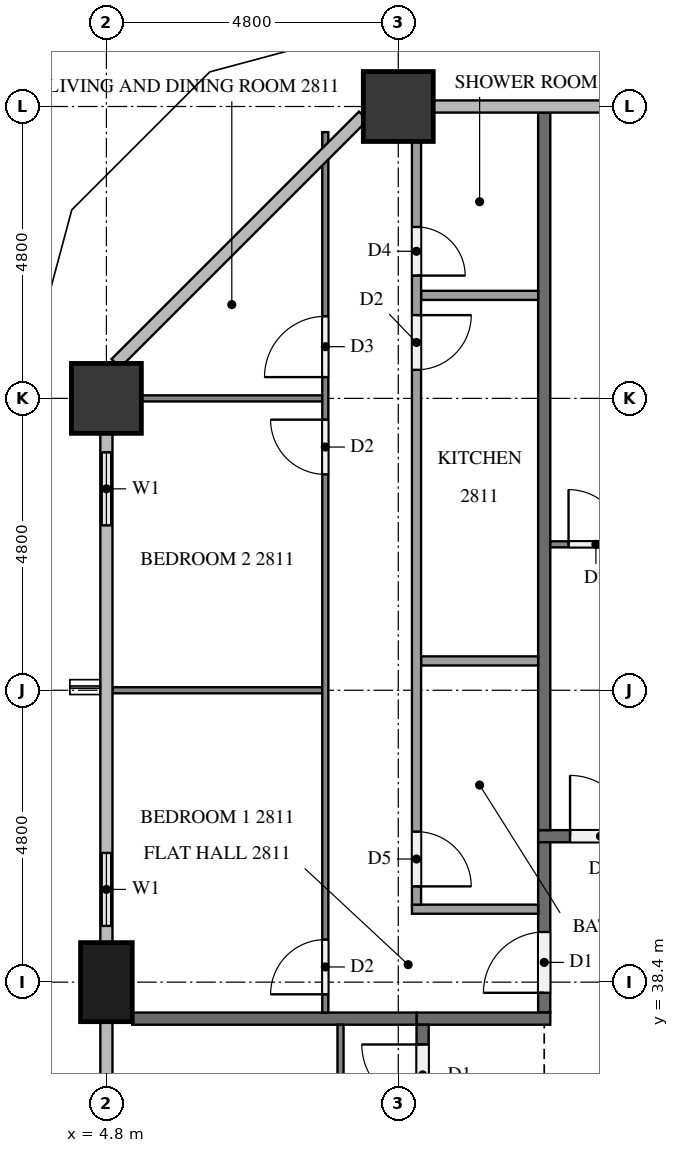
"""IFC4 building model, lengths in metres.
Left out: names, types, materials, properties, quantities, classifications, styles, units other than length and angle.
Written with IfcOpenShell. Run it as: python <this file> out.ifc"""

import sys

from ifc_helpers import new_model, si_unit, direction, frame, frame_2d, origin, origin_2d, place, context, subcontext, project, spatial, rectangle, extrude, element, fill, save


model = new_model("IFC4")
c1 = context("Model", 3, precision=1e-05, world=origin(), true_north=direction((0.0, 1.0)))
c2 = subcontext(c1, "Body", "Model", "MODEL_VIEW")
j1 = project(units=[si_unit("LENGTHUNIT", "METRE"), si_unit("PLANEANGLEUNIT", "RADIAN")], contexts=[c1])
p1 = place(None, origin())
s1 = spatial("IfcSite", under=j1, at=p1, CompositionType="ELEMENT")
p2 = place(p1, origin())
s2 = spatial("IfcBuilding", under=s1, at=p2, CompositionType="ELEMENT")
p3 = place(p2, frame((0.0, 0.0, 110.2)))
s3 = spatial("IfcBuildingStorey", under=s2, at=p3, CompositionType="ELEMENT", Elevation=110.2)
for number, where, z_axis, x_axis in (
    (1, (9.6, 52.8, 0.0), (0.0, 0.0, 1.0), (1.0, 0.0, 0.0)),
    (2, (4.8, 48.0, 0.0), (0.0, 0.0, 1.0), (1.0, 0.0, 0.0)),
):
    element("IfcColumn", number, at=place(p3, frame(where, z_axis=z_axis, x_axis=x_axis)), inside=s3, PredefinedType="COLUMN", context=c2, shape_type="SweptSolid", body=[
        extrude(rectangle(XDim=1.15, YDim=1.15, at=origin_2d()), origin(), (0.0, 0.0, 1.0), 3.1),
    ])
p4 = place(p3, frame((4.8, 38.4, 0.0), z_axis=(0.0, 0.0, 1.0), x_axis=(0.0, 1.0, 0.0)))
e3 = element("IfcColumn", 3, at=p4, inside=s3, PredefinedType="COLUMN", context=c2, shape_type="SweptSolid", body=[
    extrude(rectangle(XDim=1.3, YDim=0.85, at=origin_2d()), origin(), (0.0, 0.0, 1.0), 3.1),
])
p5 = place(p3, frame((4.8, 47.425, 0.0), z_axis=(0.0, 0.0, 1.0), x_axis=(0.0, -1.0, 0.0)))
e4 = element("IfcWall", 4, at=p5, inside=s3, PredefinedType="SOLIDWALL", context=c2, shape_type="SweptSolid", body=[
    extrude(rectangle(XDim=1.825, YDim=0.15, at=frame_2d((0.913, 0.0))), origin(), (0.0, 0.0, 1.0), 3.1),
])
p6 = place(p5, frame((0.312, 0.0, 0.9)))
e5 = element("IfcOpeningElement", 5, at=p6, cuts=e4, PredefinedType="OPENING", context=c2, shape_type="SweptSolid", body=[
    extrude(rectangle(XDim=1.2, YDim=1.4, at=frame_2d((0.6, 0.7))), frame((0.0, 0.085, 0.0), z_axis=(0.0, -1.0, 0.0), x_axis=(1.0, 0.0, 0.0)), (0.0, 0.0, 1.0), 0.17),
])
p7 = place(p3, frame((4.8, 40.8, 0.0), z_axis=(0.0, 0.0, 1.0), x_axis=(0.0, -1.0, 0.0)))
e6 = element("IfcWall", 6, at=p7, inside=s3, PredefinedType="SOLIDWALL", context=c2, shape_type="SweptSolid", body=[
    extrude(rectangle(XDim=1.75, YDim=0.15, at=frame_2d((0.875, 0.0))), origin(), (0.0, 0.0, 1.0), 3.1),
])
p8 = place(p7, frame((0.275, 0.0, 0.9)))
e7 = element("IfcOpeningElement", 7, at=p8, cuts=e6, PredefinedType="OPENING", context=c2, shape_type="SweptSolid", body=[
    extrude(rectangle(XDim=1.2, YDim=1.4, at=frame_2d((0.6, 0.7))), frame((0.0, 0.085, 0.0), z_axis=(0.0, -1.0, 0.0), x_axis=(1.0, 0.0, 0.0)), (0.0, 0.0, 1.0), 0.17),
])
p9 = place(p3, frame((11.9, 40.8, 0.0), z_axis=(0.0, 0.0, 1.0), x_axis=(1.0, 0.0, 0.0)))
e8 = element("IfcWall", 8, at=p9, inside=s3, PredefinedType="PARTITIONING", context=c2, shape_type="SweptSolid", body=[
    extrude(rectangle(XDim=38.6, YDim=0.2, at=frame_2d((19.3, 0.0))), origin(), (0.0, 0.0, 1.0), 3.1),
])
p10 = place(p9, frame((37.075, 0.0, 0.0)))
e9 = element("IfcOpeningElement", 9, at=p10, cuts=e8, PredefinedType="OPENING", context=c2, shape_type="SweptSolid", body=[
    extrude(rectangle(XDim=1.0, YDim=2.1, at=frame_2d((0.5, 1.05))), frame((0.0, 0.11, 0.0), z_axis=(0.0, -1.0, 0.0), x_axis=(1.0, 0.0, 0.0)), (0.0, 0.0, 1.0), 0.22),
])
p11 = place(p9, frame((14.925, 0.0, 0.0)))
e10 = element("IfcOpeningElement", 10, at=p11, cuts=e8, PredefinedType="OPENING", context=c2, shape_type="SweptSolid", body=[
    extrude(rectangle(XDim=1.0, YDim=2.1, at=frame_2d((0.5, 1.05))), frame((0.0, 0.11, 0.0), z_axis=(0.0, -1.0, 0.0), x_axis=(1.0, 0.0, 0.0)), (0.0, 0.0, 1.0), 0.22),
])
p12 = place(p9, frame((0.525, 0.0, 0.0)))
e11 = element("IfcOpeningElement", 11, at=p12, cuts=e8, PredefinedType="OPENING", context=c2, shape_type="SweptSolid", body=[
    extrude(rectangle(XDim=1.0, YDim=2.1, at=frame_2d((0.5, 1.05))), frame((0.0, 0.11, 0.0), z_axis=(0.0, -1.0, 0.0), x_axis=(1.0, 0.0, 0.0)), (0.0, 0.0, 1.0), 0.22),
])
p13 = place(p3, frame((12.0, 37.9, 0.0), z_axis=(0.0, 0.0, 1.0), x_axis=(0.0, 1.0, 0.0)))
e12 = element("IfcWall", 12, at=p13, inside=s3, PredefinedType="PARTITIONING", context=c2, shape_type="SweptSolid", body=[
    extrude(rectangle(XDim=2.8, YDim=0.2, at=frame_2d((1.4, 0.0))), origin(), (0.0, 0.0, 1.0), 3.1),
])
p14 = place(p13, frame((0.325, 0.0, 0.0)))
e13 = element("IfcOpeningElement", 13, at=p14, cuts=e12, PredefinedType="OPENING", context=c2, shape_type="SweptSolid", body=[
    extrude(rectangle(XDim=1.0, YDim=2.1, at=frame_2d((0.5, 1.05))), frame((0.0, 0.11, 0.0), z_axis=(0.0, -1.0, 0.0), x_axis=(1.0, 0.0, 0.0)), (0.0, 0.0, 1.0), 0.22),
])
p15 = place(p3, frame((12.1, 37.8, 0.0), z_axis=(0.0, 0.0, 1.0), x_axis=(-1.0, 0.0, 0.0)))
e14 = element("IfcWall", 14, at=p15, inside=s3, PredefinedType="PARTITIONING", context=c2, shape_type="SweptSolid", body=[
    extrude(rectangle(XDim=2.2, YDim=0.2, at=frame_2d((1.1, 0.0))), origin(), (0.0, 0.0, 1.0), 3.1),
])
p16 = place(p3, frame((10.0, 15.1, 0.0), z_axis=(0.0, 0.0, 1.0), x_axis=(0.0, 1.0, 0.0)))
e15 = element("IfcWall", 15, at=p16, inside=s3, PredefinedType="PARTITIONING", context=c2, shape_type="SweptSolid", body=[
    extrude(rectangle(XDim=22.6, YDim=0.2, at=frame_2d((11.3, 0.0))), origin(), (0.0, 0.0, 1.0), 3.1),
])
p17 = place(p16, frame((21.275, 0.0, 0.0)))
e16 = element("IfcOpeningElement", 16, at=p17, cuts=e15, PredefinedType="OPENING", context=c2, shape_type="SweptSolid", body=[
    extrude(rectangle(XDim=1.0, YDim=2.1, at=frame_2d((0.5, 1.05))), frame((0.0, 0.11, 0.0), z_axis=(0.0, -1.0, 0.0), x_axis=(1.0, 0.0, 0.0)), (0.0, 0.0, 1.0), 0.22),
])
p18 = place(p3, frame((12.0, 52.7, 0.0), z_axis=(0.0, 0.0, 1.0), x_axis=(0.0, -1.0, 0.0)))
e17 = element("IfcWall", 17, at=p18, inside=s3, PredefinedType="PARTITIONING", context=c2, shape_type="SweptSolid", body=[
    extrude(rectangle(XDim=11.8, YDim=0.2, at=frame_2d((5.9, 0.0))), origin(), (0.0, 0.0, 1.0), 3.1),
])
p19 = place(p3, frame((5.225, 37.8, 0.0), z_axis=(0.0, 0.0, 1.0), x_axis=(1.0, 0.0, 0.0)))
e18 = element("IfcWall", 18, at=p19, inside=s3, PredefinedType="PARTITIONING", context=c2, shape_type="SweptSolid", body=[
    extrude(rectangle(XDim=4.675, YDim=0.2, at=frame_2d((2.337, 0.0))), origin(), (0.0, 0.0, 1.0), 3.1),
])
p20 = place(p3, frame((12.1, 45.6, 0.0), z_axis=(0.0, 0.0, 1.0), x_axis=(1.0, 0.0, 0.0)))
e19 = element("IfcWall", 19, at=p20, inside=s3, PredefinedType="PARTITIONING", context=c2, shape_type="SweptSolid", body=[
    extrude(rectangle(XDim=14.2, YDim=0.1, at=frame_2d((7.1, 0.0))), origin(), (0.0, 0.0, 1.0), 3.1),
])
p21 = place(p20, frame((0.3, 0.0, 0.0)))
e20 = element("IfcOpeningElement", 20, at=p21, cuts=e19, PredefinedType="OPENING", context=c2, shape_type="SweptSolid", body=[
    extrude(rectangle(XDim=0.9, YDim=2.1, at=frame_2d((0.45, 1.05))), frame((0.0, 0.06, 0.0), z_axis=(0.0, -1.0, 0.0), x_axis=(1.0, 0.0, 0.0)), (0.0, 0.0, 1.0), 0.12),
])
p22 = place(p20, frame((8.15, 0.0, 0.0)))
e21 = element("IfcOpeningElement", 21, at=p22, cuts=e19, PredefinedType="OPENING", context=c2, shape_type="SweptSolid", body=[
    extrude(rectangle(XDim=1.0, YDim=2.1, at=frame_2d((0.5, 1.05))), frame((0.0, 0.06, 0.0), z_axis=(0.0, -1.0, 0.0), x_axis=(1.0, 0.0, 0.0)), (0.0, 0.0, 1.0), 0.12),
])
p23 = place(p20, frame((9.85, 0.0, 0.0)))
e22 = element("IfcOpeningElement", 22, at=p23, cuts=e19, PredefinedType="OPENING", context=c2, shape_type="SweptSolid", body=[
    extrude(rectangle(XDim=0.9, YDim=2.1, at=frame_2d((0.45, 1.05))), frame((0.0, 0.06, 0.0), z_axis=(0.0, -1.0, 0.0), x_axis=(1.0, 0.0, 0.0)), (0.0, 0.0, 1.0), 0.12),
])
p24 = place(p3, frame((8.35, 43.2, 0.0), z_axis=(0.0, 0.0, 1.0), x_axis=(-1.0, 0.0, 0.0)))
e23 = element("IfcWall", 23, at=p24, inside=s3, PredefinedType="PARTITIONING", context=c2, shape_type="SweptSolid", body=[
    extrude(rectangle(XDim=3.45, YDim=0.1, at=frame_2d((1.725, 0.0))), origin(), (0.0, 0.0, 1.0), 3.1),
])
p25 = place(p3, frame((8.35, 48.0, 0.0), z_axis=(0.0, 0.0, 1.0), x_axis=(-1.0, 0.0, 0.0)))
e24 = element("IfcWall", 24, at=p25, inside=s3, PredefinedType="PARTITIONING", context=c2, shape_type="SweptSolid", body=[
    extrude(rectangle(XDim=2.975, YDim=0.1, at=frame_2d((1.488, 0.0))), origin(), (0.0, 0.0, 1.0), 3.1),
])
p26 = place(p3, frame((8.4, 37.9, 0.0), z_axis=(0.0, 0.0, 1.0), x_axis=(0.0, 1.0, 0.0)))
e25 = element("IfcWall", 25, at=p26, inside=s3, PredefinedType="PARTITIONING", context=c2, shape_type="SweptSolid", body=[
    extrude(rectangle(XDim=14.479, YDim=0.1, at=frame_2d((7.239, 0.0))), origin(), (0.0, 0.0, 1.0), 3.1),
])
p27 = place(p26, frame((0.3, 0.0, 0.0)))
e26 = element("IfcOpeningElement", 26, at=p27, cuts=e25, PredefinedType="OPENING", context=c2, shape_type="SweptSolid", body=[
    extrude(rectangle(XDim=0.9, YDim=2.1, at=frame_2d((0.45, 1.05))), frame((0.0, 0.06, 0.0), z_axis=(0.0, -1.0, 0.0), x_axis=(1.0, 0.0, 0.0)), (0.0, 0.0, 1.0), 0.12),
])
p28 = place(p26, frame((8.85, 0.0, 0.0)))
e27 = element("IfcOpeningElement", 27, at=p28, cuts=e25, PredefinedType="OPENING", context=c2, shape_type="SweptSolid", body=[
    extrude(rectangle(XDim=0.9, YDim=2.1, at=frame_2d((0.45, 1.05))), frame((0.0, 0.06, 0.0), z_axis=(0.0, -1.0, 0.0), x_axis=(1.0, 0.0, 0.0)), (0.0, 0.0, 1.0), 0.12),
])
p29 = place(p26, frame((10.45, 0.0, 0.0)))
e28 = element("IfcOpeningElement", 28, at=p29, cuts=e25, PredefinedType="OPENING", context=c2, shape_type="SweptSolid", body=[
    extrude(rectangle(XDim=1.0, YDim=2.1, at=frame_2d((0.5, 1.05))), frame((0.0, 0.06, 0.0), z_axis=(0.0, -1.0, 0.0), x_axis=(1.0, 0.0, 0.0)), (0.0, 0.0, 1.0), 0.12),
])
for number, where, z_axis, x_axis in (
    (29, (11.9, 43.683, 0.0), (0.0, 0.0, 1.0), (-1.0, 0.0, 0.0)),
    (30, (11.9, 49.694, 0.0), (0.0, 0.0, 1.0), (-1.0, 0.0, 0.0)),
):
    element("IfcWall", number, at=place(p3, frame(where, z_axis=z_axis, x_axis=x_axis)), inside=s3, PredefinedType="PARTITIONING", context=c2, shape_type="SweptSolid", body=[
        extrude(rectangle(XDim=1.925, YDim=0.15, at=frame_2d((0.962, 0.0))), origin(), (0.0, 0.0, 1.0), 3.1),
    ])
p30 = place(p3, frame((11.9, 39.6, 0.0), z_axis=(0.0, 0.0, 1.0), x_axis=(-1.0, 0.0, 0.0)))
e31 = element("IfcWall", 31, at=p30, inside=s3, PredefinedType="PARTITIONING", context=c2, shape_type="SweptSolid", body=[
    extrude(rectangle(XDim=2.075, YDim=0.15, at=frame_2d((1.038, 0.0))), origin(), (0.0, 0.0, 1.0), 3.1),
])
p31 = place(p3, frame((9.9, 52.225, 0.0), z_axis=(0.0, 0.0, 1.0), x_axis=(0.0, -1.0, 0.0)))
e32 = element("IfcWall", 32, at=p31, inside=s3, PredefinedType="PARTITIONING", context=c2, shape_type="SweptSolid", body=[
    extrude(rectangle(XDim=12.55, YDim=0.15, at=frame_2d((6.275, 0.0))), origin(), (0.0, 0.0, 1.0), 3.1),
])
p32 = place(p31, frame((11.35, 0.0, 0.0)))
e33 = element("IfcOpeningElement", 33, at=p32, cuts=e32, PredefinedType="OPENING", context=c2, shape_type="SweptSolid", body=[
    extrude(rectangle(XDim=0.9, YDim=2.1, at=frame_2d((0.45, 1.05))), frame((0.0, 0.085, 0.0), z_axis=(0.0, -1.0, 0.0), x_axis=(1.0, 0.0, 0.0)), (0.0, 0.0, 1.0), 0.17),
])
p33 = place(p31, frame((2.856, 0.0, 0.0)))
e34 = element("IfcOpeningElement", 34, at=p33, cuts=e32, PredefinedType="OPENING", context=c2, shape_type="SweptSolid", body=[
    extrude(rectangle(XDim=0.9, YDim=2.1, at=frame_2d((0.45, 1.05))), frame((0.0, 0.085, 0.0), z_axis=(0.0, -1.0, 0.0), x_axis=(1.0, 0.0, 0.0)), (0.0, 0.0, 1.0), 0.17),
])
p34 = place(p31, frame((1.406, 0.0, 0.0)))
e35 = element("IfcOpeningElement", 35, at=p34, cuts=e32, PredefinedType="OPENING", context=c2, shape_type="SweptSolid", body=[
    extrude(rectangle(XDim=0.8, YDim=2.1, at=frame_2d((0.4, 1.05))), frame((0.0, 0.085, 0.0), z_axis=(0.0, -1.0, 0.0), x_axis=(1.0, 0.0, 0.0)), (0.0, 0.0, 1.0), 0.17),
])
p35 = place(p3, frame((8.65, 15.1, 0.0), z_axis=(0.0, 0.0, 1.0), x_axis=(0.0, 1.0, 0.0)))
e36 = element("IfcWall", 36, at=p35, inside=s3, PredefinedType="PARTITIONING", context=c2, shape_type="SweptSolid", body=[
    extrude(rectangle(XDim=22.6, YDim=0.1, at=frame_2d((11.3, 0.0))), origin(), (0.0, 0.0, 1.0), 3.1),
])
p36 = place(p35, frame((16.45, 0.0, 0.0)))
e37 = element("IfcOpeningElement", 37, at=p36, cuts=e36, PredefinedType="OPENING", context=c2, shape_type="SweptSolid", body=[
    extrude(rectangle(XDim=1.0, YDim=2.1, at=frame_2d((0.5, 1.05))), frame((0.0, 0.06, 0.0), z_axis=(0.0, -1.0, 0.0), x_axis=(1.0, 0.0, 0.0)), (0.0, 0.0, 1.0), 0.12),
])
p37 = place(p35, frame((14.85, 0.0, 0.0)))
e38 = element("IfcOpeningElement", 38, at=p37, cuts=e36, PredefinedType="OPENING", context=c2, shape_type="SweptSolid", body=[
    extrude(rectangle(XDim=0.9, YDim=2.1, at=frame_2d((0.45, 1.05))), frame((0.0, 0.06, 0.0), z_axis=(0.0, -1.0, 0.0), x_axis=(1.0, 0.0, 0.0)), (0.0, 0.0, 1.0), 0.12),
])
p38 = place(p35, frame((11.65, 0.0, 0.0)))
e39 = element("IfcOpeningElement", 39, at=p38, cuts=e36, PredefinedType="OPENING", context=c2, shape_type="SweptSolid", body=[
    extrude(rectangle(XDim=0.8, YDim=2.1, at=frame_2d((0.4, 1.05))), frame((0.0, 0.06, 0.0), z_axis=(0.0, -1.0, 0.0), x_axis=(1.0, 0.0, 0.0)), (0.0, 0.0, 1.0), 0.12),
])
p39 = place(p35, frame((10.05, 0.0, 0.0)))
e40 = element("IfcOpeningElement", 40, at=p39, cuts=e36, PredefinedType="OPENING", context=c2, shape_type="SweptSolid", body=[
    extrude(rectangle(XDim=0.9, YDim=2.1, at=frame_2d((0.45, 1.05))), frame((0.0, 0.06, 0.0), z_axis=(0.0, -1.0, 0.0), x_axis=(1.0, 0.0, 0.0)), (0.0, 0.0, 1.0), 0.12),
])
p40 = place(p35, frame((2.05, 0.0, 0.0)))
e41 = element("IfcOpeningElement", 41, at=p40, cuts=e36, PredefinedType="OPENING", context=c2, shape_type="SweptSolid", body=[
    extrude(rectangle(XDim=0.9, YDim=2.1, at=frame_2d((0.45, 1.05))), frame((0.0, 0.06, 0.0), z_axis=(0.0, -1.0, 0.0), x_axis=(1.0, 0.0, 0.0)), (0.0, 0.0, 1.0), 0.12),
])
p41 = place(p35, frame((0.45, 0.0, 0.0)))
e42 = element("IfcOpeningElement", 42, at=p41, cuts=e36, PredefinedType="OPENING", context=c2, shape_type="SweptSolid", body=[
    extrude(rectangle(XDim=0.9, YDim=2.1, at=frame_2d((0.45, 1.05))), frame((0.0, 0.06, 0.0), z_axis=(0.0, -1.0, 0.0), x_axis=(1.0, 0.0, 0.0)), (0.0, 0.0, 1.0), 0.12),
])
p42 = place(p6, origin())
e43 = element("IfcWindow", 43, at=p42, inside=s3, PartitioningType="SINGLE_PANEL", PredefinedType="WINDOW", context=c2, shape_type="SweptSolid", body=[
    extrude(rectangle(XDim=1.2, YDim=1.4, at=frame_2d((0.6, 0.7))), frame((0.0, 0.03, 0.0), z_axis=(0.0, -1.0, 0.0), x_axis=(1.0, 0.0, 0.0)), (0.0, 0.0, 1.0), 0.06),
])
fill(e5, e43)
p43 = place(p8, origin())
e44 = element("IfcWindow", 44, at=p43, inside=s3, PartitioningType="SINGLE_PANEL", PredefinedType="WINDOW", context=c2, shape_type="SweptSolid", body=[
    extrude(rectangle(XDim=1.2, YDim=1.4, at=frame_2d((0.6, 0.7))), frame((0.0, 0.03, 0.0), z_axis=(0.0, -1.0, 0.0), x_axis=(1.0, 0.0, 0.0)), (0.0, 0.0, 1.0), 0.06),
])
fill(e7, e44)
p44 = place(p12, origin())
e45 = element("IfcDoor", 45, at=p44, inside=s3, OperationType="SINGLE_SWING_LEFT", PredefinedType="DOOR", context=c2, shape_type="SweptSolid", body=[
    extrude(rectangle(XDim=1.0, YDim=2.1, at=frame_2d((0.5, 1.05))), frame((0.0, 0.025, 0.0), z_axis=(0.0, -1.0, 0.0), x_axis=(1.0, 0.0, 0.0)), (0.0, 0.0, 1.0), 0.05),
])
fill(e11, e45)
p45 = place(p14, origin())
e46 = element("IfcDoor", 46, at=p45, inside=s3, OperationType="SINGLE_SWING_LEFT", PredefinedType="DOOR", context=c2, shape_type="SweptSolid", body=[
    extrude(rectangle(XDim=1.0, YDim=2.1, at=frame_2d((0.5, 1.05))), frame((0.0, 0.025, 0.0), z_axis=(0.0, -1.0, 0.0), x_axis=(1.0, 0.0, 0.0)), (0.0, 0.0, 1.0), 0.05),
])
fill(e13, e46)
p46 = place(p17, origin())
e47 = element("IfcDoor", 47, at=p46, inside=s3, OperationType="SINGLE_SWING_RIGHT", PredefinedType="DOOR", context=c2, shape_type="SweptSolid", body=[
    extrude(rectangle(XDim=1.0, YDim=2.1, at=frame_2d((0.5, 1.05))), frame((0.0, 0.025, 0.0), z_axis=(0.0, -1.0, 0.0), x_axis=(1.0, 0.0, 0.0)), (0.0, 0.0, 1.0), 0.05),
])
fill(e16, e47)
p47 = place(p21, origin())
e48 = element("IfcDoor", 48, at=p47, inside=s3, OperationType="SINGLE_SWING_LEFT", PredefinedType="DOOR", context=c2, shape_type="SweptSolid", body=[
    extrude(rectangle(XDim=0.9, YDim=2.1, at=frame_2d((0.45, 1.05))), frame((0.0, 0.025, 0.0), z_axis=(0.0, -1.0, 0.0), x_axis=(1.0, 0.0, 0.0)), (0.0, 0.0, 1.0), 0.05),
])
fill(e20, e48)
p48 = place(p27, origin())
e49 = element("IfcDoor", 49, at=p48, inside=s3, OperationType="SINGLE_SWING_LEFT", PredefinedType="DOOR", context=c2, shape_type="SweptSolid", body=[
    extrude(rectangle(XDim=0.9, YDim=2.1, at=frame_2d((0.45, 1.05))), frame((0.0, 0.025, 0.0), z_axis=(0.0, -1.0, 0.0), x_axis=(1.0, 0.0, 0.0)), (0.0, 0.0, 1.0), 0.05),
])
fill(e26, e49)
p49 = place(p28, origin())
e50 = element("IfcDoor", 50, at=p49, inside=s3, OperationType="SINGLE_SWING_RIGHT", PredefinedType="DOOR", context=c2, shape_type="SweptSolid", body=[
    extrude(rectangle(XDim=0.9, YDim=2.1, at=frame_2d((0.45, 1.05))), frame((0.0, 0.025, 0.0), z_axis=(0.0, -1.0, 0.0), x_axis=(1.0, 0.0, 0.0)), (0.0, 0.0, 1.0), 0.05),
])
fill(e27, e50)
p50 = place(p29, origin())
e51 = element("IfcDoor", 51, at=p50, inside=s3, OperationType="SINGLE_SWING_LEFT", PredefinedType="DOOR", context=c2, shape_type="SweptSolid", body=[
    extrude(rectangle(XDim=1.0, YDim=2.1, at=frame_2d((0.5, 1.05))), frame((0.0, 0.025, 0.0), z_axis=(0.0, -1.0, 0.0), x_axis=(1.0, 0.0, 0.0)), (0.0, 0.0, 1.0), 0.05),
])
fill(e28, e51)
p51 = place(p32, origin())
e52 = element("IfcDoor", 52, at=p51, inside=s3, OperationType="SINGLE_SWING_RIGHT", PredefinedType="DOOR", context=c2, shape_type="SweptSolid", body=[
    extrude(rectangle(XDim=0.9, YDim=2.1, at=frame_2d((0.45, 1.05))), frame((0.0, 0.025, 0.0), z_axis=(0.0, -1.0, 0.0), x_axis=(1.0, 0.0, 0.0)), (0.0, 0.0, 1.0), 0.05),
])
fill(e33, e52)
p52 = place(p33, origin())
e53 = element("IfcDoor", 53, at=p52, inside=s3, OperationType="SINGLE_SWING_LEFT", PredefinedType="DOOR", context=c2, shape_type="SweptSolid", body=[
    extrude(rectangle(XDim=0.9, YDim=2.1, at=frame_2d((0.45, 1.05))), frame((0.0, 0.025, 0.0), z_axis=(0.0, -1.0, 0.0), x_axis=(1.0, 0.0, 0.0)), (0.0, 0.0, 1.0), 0.05),
])
fill(e34, e53)
p53 = place(p34, origin())
e54 = element("IfcDoor", 54, at=p53, inside=s3, OperationType="SINGLE_SWING_RIGHT", PredefinedType="DOOR", context=c2, shape_type="SweptSolid", body=[
    extrude(rectangle(XDim=0.8, YDim=2.1, at=frame_2d((0.4, 1.05))), frame((0.0, 0.025, 0.0), z_axis=(0.0, -1.0, 0.0), x_axis=(1.0, 0.0, 0.0)), (0.0, 0.0, 1.0), 0.05),
])
fill(e35, e54)
save(model, sys.argv[1])
